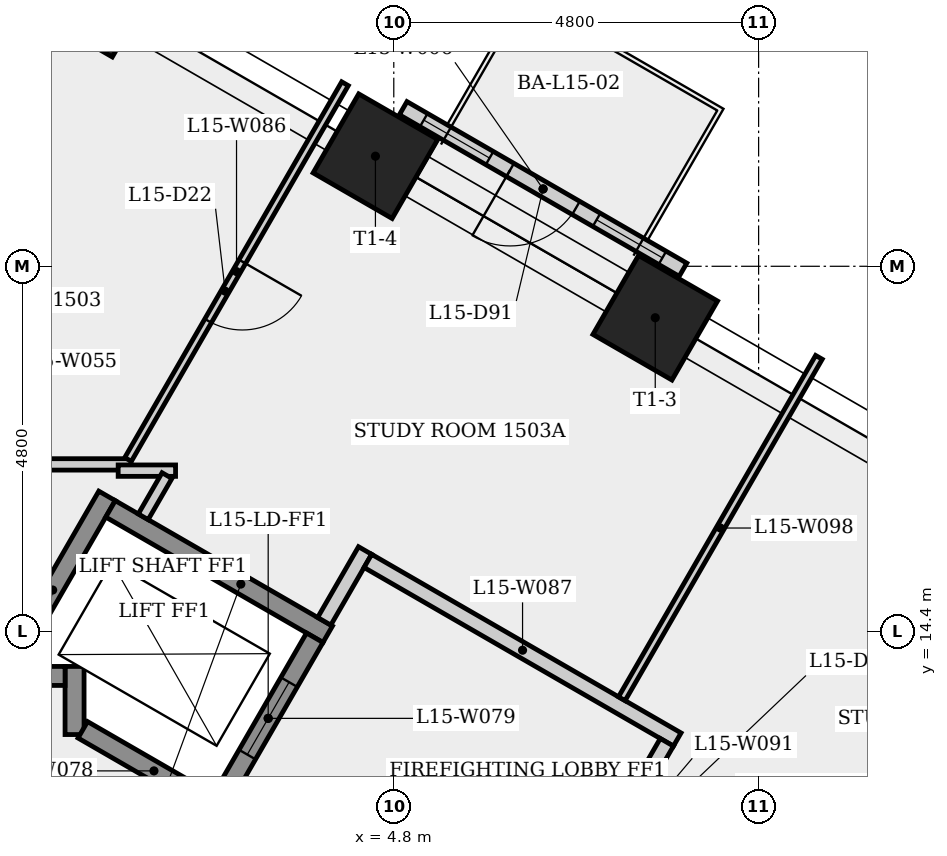
"""IFC4 building model, lengths in metres.
Left out: names, types, materials, properties, quantities, classifications, styles, units other than length and angle.
Written with IfcOpenShell. Run it as: python <this file> out.ifc"""

import sys

from ifc_helpers import new_model, si_unit, direction, frame, frame_2d, origin, origin_2d, place, context, subcontext, project, spatial, rectangle, extrude, element, fill, save


model = new_model("IFC4")
c1 = context("Model", 3, precision=1e-05, world=origin(), true_north=direction((0.0, 1.0)))
c2 = subcontext(c1, "Body", "Model", "MODEL_VIEW")
j1 = project(units=[si_unit("LENGTHUNIT", "METRE"), si_unit("PLANEANGLEUNIT", "RADIAN")], contexts=[c1])
p1 = place(None, origin())
s1 = spatial("IfcSite", under=j1, at=p1, CompositionType="ELEMENT")
p2 = place(p1, origin())
s2 = spatial("IfcBuilding", under=s1, at=p2, CompositionType="ELEMENT")
p3 = place(p2, frame((0.0, 0.0, 59.5)))
s3 = spatial("IfcBuildingStorey", under=s2, at=p3, CompositionType="ELEMENT", Elevation=59.5)
for number, where, z_axis, x_axis in (
    (1, (8.24, 18.523, 0.0), (0.0, 0.0, 1.0), (0.5, 0.866, 0.0)),
    (2, (4.558, 20.649, 0.0), (0.0, 0.0, 1.0), (0.5, 0.866, 0.0)),
    (3, (0.877, 22.774, 0.0), (0.0, 0.0, 1.0), (0.5, 0.866, 0.0)),
):
    element("IfcColumn", number, at=place(p3, frame(where, z_axis=z_axis, x_axis=x_axis)), inside=s3, PredefinedType="COLUMN", context=c2, shape_type="SweptSolid", body=[
        extrude(rectangle(XDim=1.2, YDim=1.2, at=origin_2d()), origin(), (0.0, 0.0, 1.0), 3.4),
    ])
p4 = place(p3, frame((8.605, 19.155, 0.0), z_axis=(0.0, 0.0, 1.0), x_axis=(-0.866022039226, 0.500005827542, 0.0)))
e4 = element("IfcWall", 4, at=p4, inside=s3, PredefinedType="SOLIDWALL", context=c2, shape_type="SweptSolid", body=[
    extrude(rectangle(XDim=4.251, YDim=0.2, at=frame_2d((2.125, 0.0))), origin(), (0.0, 0.0, 1.0), 3.4),
])
p5 = place(p4, frame((1.625, 0.0, 0.0)))
e5 = element("IfcOpeningElement", 5, at=p5, cuts=e4, PredefinedType="OPENING", context=c2, shape_type="SweptSolid", body=[
    extrude(rectangle(XDim=1.0, YDim=2.4, at=frame_2d((0.5, 1.2))), frame((0.0, 0.11, 0.0), z_axis=(0.0, -1.0, 0.0), x_axis=(1.0, 0.0, 0.0)), (0.0, 0.0, 1.0), 0.22),
])
p6 = place(p4, frame((0.313, 0.0, 0.9)))
e6 = element("IfcOpeningElement", 6, at=p6, cuts=e4, PredefinedType="OPENING", context=c2, shape_type="SweptSolid", body=[
    extrude(rectangle(XDim=1.0, YDim=1.5, at=frame_2d((0.5, 0.75))), frame((0.0, 0.11, 0.0), z_axis=(0.0, -1.0, 0.0), x_axis=(1.0, 0.0, 0.0)), (0.0, 0.0, 1.0), 0.22),
])
p7 = place(p4, frame((2.938, 0.0, 0.9)))
e7 = element("IfcOpeningElement", 7, at=p7, cuts=e4, PredefinedType="OPENING", context=c2, shape_type="SweptSolid", body=[
    extrude(rectangle(XDim=1.0, YDim=1.5, at=frame_2d((0.5, 0.75))), frame((0.0, 0.11, 0.0), z_axis=(0.0, -1.0, 0.0), x_axis=(1.0, 0.0, 0.0)), (0.0, 0.0, 1.0), 0.22),
])
p8 = place(p3, frame((-3.016, 16.593, 0.0), z_axis=(0.0, 0.0, 1.0), x_axis=(1.0, 0.0, 0.0)))
e8 = element("IfcWall", 8, at=p8, inside=s3, PredefinedType="PARTITIONING", context=c2, shape_type="SweptSolid", body=[
    extrude(rectangle(XDim=4.357, YDim=0.15, at=frame_2d((2.179, 0.0))), origin(), (0.0, 0.0, 1.0), 3.05),
])
p9 = place(p8, frame((1.679, 0.0, 0.0)))
e9 = element("IfcOpeningElement", 9, at=p9, cuts=e8, PredefinedType="OPENING", context=c2, shape_type="SweptSolid", body=[
    extrude(rectangle(XDim=1.0, YDim=2.1, at=frame_2d((0.5, 1.05))), frame((0.0, 0.085, 0.0), z_axis=(0.0, -1.0, 0.0), x_axis=(1.0, 0.0, 0.0)), (0.0, 0.0, 1.0), 0.17),
])
p10 = place(p3, frame((-0.403, 13.702, 0.0), z_axis=(0.0, 0.0, 1.0), x_axis=(0.499976111731, 0.866039195244, 0.0)))
e10 = element("IfcWall", 10, at=p10, inside=s3, PredefinedType="SHEAR", context=c2, shape_type="SweptSolid", body=[
    extrude(rectangle(XDim=2.861, YDim=0.25, at=frame_2d((1.43, 0.0))), origin(), (0.0, 0.0, 1.0), 3.05),
])
p11 = place(p3, frame((0.6, 13.039, 0.0), z_axis=(0.0, 0.0, 1.0), x_axis=(0.0, 1.0, 0.0)))
e11 = element("IfcWall", 11, at=p11, inside=s3, PredefinedType="SHEAR", context=c2, shape_type="SweptSolid", body=[
    extrude(rectangle(XDim=0.896, YDim=0.25, at=frame_2d((0.448, 0.0))), origin(), (0.0, 0.0, 1.0), 3.05),
])
p12 = place(p3, frame((0.475, 13.81, 0.0), z_axis=(0.0, 0.0, 1.0), x_axis=(-1.0, 0.0, 0.0)))
e12 = element("IfcWall", 12, at=p12, inside=s3, PredefinedType="SHEAR", context=c2, shape_type="SweptSolid", body=[
    extrude(rectangle(XDim=0.691, YDim=0.25, at=frame_2d((0.345, 0.0))), origin(), (0.0, 0.0, 1.0), 3.4),
])
p13 = place(p3, frame((1.073, 16.008, 0.0), z_axis=(0.0, 0.0, 1.0), x_axis=(0.866040211805, -0.499974350878, 0.0)))
e13 = element("IfcWall", 13, at=p13, inside=s3, PredefinedType="SHEAR", context=c2, shape_type="SweptSolid", body=[
    extrude(rectangle(XDim=3.3, YDim=0.25, at=frame_2d((1.65, 0.0))), origin(), (0.0, 0.0, 1.0), 3.05),
])
p14 = place(p3, frame((1.174, 16.511, 0.0), z_axis=(0.0, 0.0, 1.0), x_axis=(1.0, 0.0, 0.0)))
e14 = element("IfcWall", 14, at=p14, inside=s3, PredefinedType="PARTITIONING", context=c2, shape_type="SweptSolid", body=[
    extrude(rectangle(XDim=0.755, YDim=0.15, at=frame_2d((0.377, 0.0))), origin(), (0.0, 0.0, 1.0), 3.05),
])
p15 = place(p3, frame((1.816, 16.446, 0.0), z_axis=(0.0, 0.0, 1.0), x_axis=(-0.50008261738, -0.865977699363, 0.0)))
e15 = element("IfcWall", 15, at=p15, inside=s3, PredefinedType="PARTITIONING", context=c2, shape_type="SweptSolid", body=[
    extrude(rectangle(XDim=0.626, YDim=0.15, at=frame_2d((0.313, 0.0))), origin(), (0.0, 0.0, 1.0), 3.05),
])
p16 = place(p3, frame((2.581, 12.02, 0.0), z_axis=(0.0, 0.0, 1.0), x_axis=(-0.86603892542, 0.499976579108, 0.0)))
e16 = element("IfcWall", 16, at=p16, inside=s3, PredefinedType="SHEAR", context=c2, shape_type="SweptSolid", body=[
    extrude(rectangle(XDim=2.162, YDim=0.25, at=frame_2d((1.081, 0.0))), origin(), (0.0, 0.0, 1.0), 3.05),
])
p17 = place(p3, frame((2.535, 12.191, 0.0), z_axis=(0.0, 0.0, 1.0), x_axis=(0.500061746146, 0.865989751695, 0.0)))
e17 = element("IfcWall", 17, at=p17, inside=s3, PredefinedType="SHEAR", context=c2, shape_type="SweptSolid", body=[
    extrude(rectangle(XDim=2.45, YDim=0.25, at=frame_2d((1.225, 0.0))), origin(), (0.0, 0.0, 1.0), 3.4),
])
p18 = place(p17, frame((0.675, 0.0, 0.0)))
e18 = element("IfcOpeningElement", 18, at=p18, cuts=e17, PredefinedType="OPENING", context=c2, shape_type="SweptSolid", body=[
    extrude(rectangle(XDim=1.1, YDim=2.1, at=frame_2d((0.55, 1.05))), frame((0.0, 0.135, 0.0), z_axis=(0.0, -1.0, 0.0), x_axis=(1.0, 0.0, 0.0)), (0.0, 0.0, 1.0), 0.27),
])
p19 = place(p3, frame((3.885, 14.529, 0.0), z_axis=(0.0, 0.0, 1.0), x_axis=(0.499997628298, 0.866026773083, 0.0)))
e19 = element("IfcWall", 19, at=p19, inside=s3, PredefinedType="PARTITIONING", context=c2, shape_type="SweptSolid", body=[
    extrude(rectangle(XDim=1.075, YDim=0.2, at=frame_2d((0.538, 0.0))), origin(), (0.0, 0.0, 1.0), 3.05),
])
p20 = place(p3, frame((4.158, 21.602, 0.0), z_axis=(0.0, 0.0, 1.0), x_axis=(-0.500002556202, -0.866023927955, 0.0)))
e20 = element("IfcWall", 20, at=p20, inside=s3, PredefinedType="PARTITIONING", context=c2, shape_type="SweptSolid", body=[
    extrude(rectangle(XDim=5.709, YDim=0.1, at=frame_2d((2.854, 0.0))), origin(), (0.0, 0.0, 1.0), 3.05),
])
p21 = place(p20, frame((2.702, 0.0, 0.0)))
e21 = element("IfcOpeningElement", 21, at=p21, cuts=e20, PredefinedType="OPENING", context=c2, shape_type="SweptSolid", body=[
    extrude(rectangle(XDim=0.9, YDim=2.1, at=frame_2d((0.45, 1.05))), frame((0.0, 0.06, 0.0), z_axis=(0.0, -1.0, 0.0), x_axis=(1.0, 0.0, 0.0)), (0.0, 0.0, 1.0), 0.12),
])
p22 = place(p3, frame((4.459, 15.323, 0.0), z_axis=(0.0, 0.0, 1.0), x_axis=(0.866016039709, -0.500016218704, 0.0)))
e22 = element("IfcWall", 22, at=p22, inside=s3, PredefinedType="PARTITIONING", context=c2, shape_type="SweptSolid", body=[
    extrude(rectangle(XDim=4.7, YDim=0.2, at=frame_2d((2.35, 0.0))), origin(), (0.0, 0.0, 1.0), 3.05),
])
p23 = place(p3, frame((6.48, 9.624, 0.0), z_axis=(0.0, 0.0, 1.0), x_axis=(0.500017246033, 0.866015446554, 0.0)))
e23 = element("IfcWall", 23, at=p23, inside=s3, PredefinedType="SHEAR", context=c2, shape_type="SweptSolid", body=[
    extrude(rectangle(XDim=3.25, YDim=0.25, at=frame_2d((1.625, 0.0))), origin(), (0.0, 0.0, 1.0), 3.05),
])
p24 = place(p23, frame((1.125, 0.0, 0.0)))
e24 = element("IfcOpeningElement", 24, at=p24, cuts=e23, PredefinedType="OPENING", context=c2, shape_type="SweptSolid", body=[
    extrude(rectangle(XDim=1.0, YDim=2.1, at=frame_2d((0.5, 1.05))), frame((0.0, 0.135, 0.0), z_axis=(0.0, -1.0, 0.0), x_axis=(1.0, 0.0, 0.0)), (0.0, 0.0, 1.0), 0.27),
])
p25 = place(p3, frame((7.8, 13.51, 0.0), z_axis=(0.0, 0.0, 1.0), x_axis=(0.499991353094, 0.866030396021, 0.0)))
e25 = element("IfcWall", 25, at=p25, inside=s3, PredefinedType="PARTITIONING", context=c2, shape_type="SweptSolid", body=[
    extrude(rectangle(XDim=5.187, YDim=0.1, at=frame_2d((2.594, 0.0))), origin(), (0.0, 0.0, 1.0), 3.05),
])
p26 = place(p3, frame((8.393, 12.937, 0.0), z_axis=(0.0, 0.0, 1.0), x_axis=(-0.500065409566, -0.86598763626, 0.0)))
e26 = element("IfcWall", 26, at=p26, inside=s3, PredefinedType="PARTITIONING", context=c2, shape_type="SweptSolid", body=[
    extrude(rectangle(XDim=0.575, YDim=0.2, at=frame_2d((0.288, 0.0))), origin(), (0.0, 0.0, 1.0), 3.05),
])
p27 = place(p5, origin())
e27 = element("IfcDoor", 27, at=p27, inside=s3, OperationType="SINGLE_SWING_RIGHT", PredefinedType="DOOR", context=c2, shape_type="SweptSolid", body=[
    extrude(rectangle(XDim=1.0, YDim=2.4, at=frame_2d((0.5, 1.2))), frame((0.0, 0.025, 0.0), z_axis=(0.0, -1.0, 0.0), x_axis=(1.0, 0.0, 0.0)), (0.0, 0.0, 1.0), 0.05),
])
fill(e5, e27)
p28 = place(p6, origin())
e28 = element("IfcWindow", 28, at=p28, inside=s3, PartitioningType="SINGLE_PANEL", PredefinedType="WINDOW", context=c2, shape_type="SweptSolid", body=[
    extrude(rectangle(XDim=1.0, YDim=1.5, at=frame_2d((0.5, 0.75))), frame((0.0, 0.03, 0.0), z_axis=(0.0, -1.0, 0.0), x_axis=(1.0, 0.0, 0.0)), (0.0, 0.0, 1.0), 0.06),
])
fill(e6, e28)
p29 = place(p7, origin())
e29 = element("IfcWindow", 29, at=p29, inside=s3, PartitioningType="SINGLE_PANEL", PredefinedType="WINDOW", context=c2, shape_type="SweptSolid", body=[
    extrude(rectangle(XDim=1.0, YDim=1.5, at=frame_2d((0.5, 0.75))), frame((0.0, 0.03, 0.0), z_axis=(0.0, -1.0, 0.0), x_axis=(1.0, 0.0, 0.0)), (0.0, 0.0, 1.0), 0.06),
])
fill(e7, e29)
p30 = place(p18, origin())
e30 = element("IfcDoor", 30, at=p30, inside=s3, OperationType="SLIDING_TO_LEFT", PredefinedType="DOOR", context=c2, shape_type="SweptSolid", body=[
    extrude(rectangle(XDim=1.1, YDim=2.1, at=frame_2d((0.55, 1.05))), frame((0.0, 0.025, 0.0), z_axis=(0.0, -1.0, 0.0), x_axis=(1.0, 0.0, 0.0)), (0.0, 0.0, 1.0), 0.05),
])
fill(e18, e30)
p31 = place(p21, origin())
e31 = element("IfcDoor", 31, at=p31, inside=s3, OperationType="SINGLE_SWING_LEFT", PredefinedType="DOOR", context=c2, shape_type="SweptSolid", body=[
    extrude(rectangle(XDim=0.9, YDim=2.1, at=frame_2d((0.45, 1.05))), frame((0.0, 0.025, 0.0), z_axis=(0.0, -1.0, 0.0), x_axis=(1.0, 0.0, 0.0)), (0.0, 0.0, 1.0), 0.05),
])
fill(e21, e31)
save(model, sys.argv[1])
